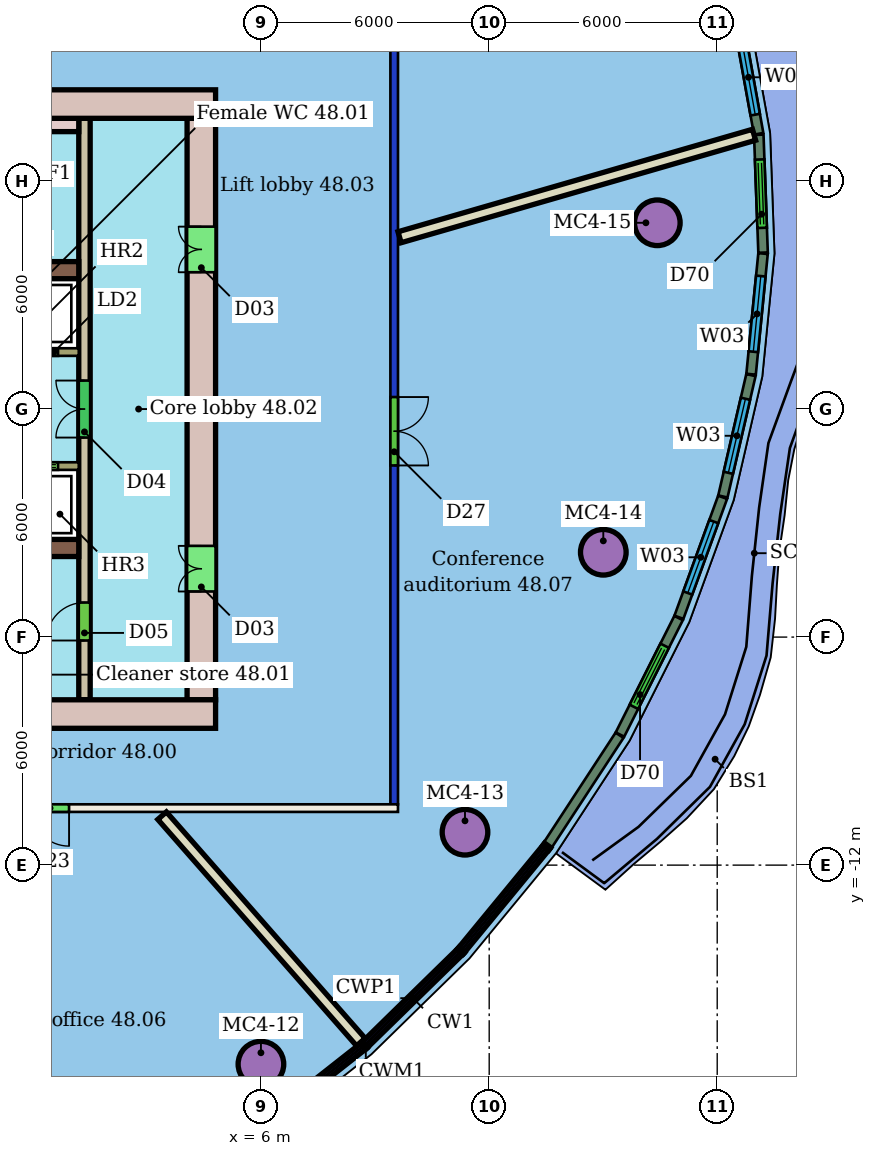
"""IFC4 building model, lengths in metres.
Left out: names, types, materials, properties, quantities, classifications, styles, units other than length and angle.
Written with IfcOpenShell. Run it as: python <this file> out.ifc"""

import sys

from ifc_helpers import new_model, si_unit, direction, frame, frame_2d, origin, origin_2d, place, context, subcontext, project, spatial, rectangle, hollow_circle, extrude, element, fill, save


model = new_model("IFC4")
c1 = context("Model", 3, precision=1e-05, world=origin(), true_north=direction((0.0, 1.0)))
c2 = subcontext(c1, "Body", "Model", "MODEL_VIEW")
j1 = project(units=[si_unit("LENGTHUNIT", "METRE"), si_unit("PLANEANGLEUNIT", "RADIAN")], contexts=[c1])
p1 = place(None, origin())
s1 = spatial("IfcSite", under=j1, at=p1, CompositionType="ELEMENT")
p2 = place(p1, origin())
s2 = spatial("IfcBuilding", under=s1, at=p2, CompositionType="ELEMENT")
p3 = place(p2, frame((0.0, 0.0, 199.3)))
s3 = spatial("IfcBuildingStorey", under=s2, at=p3, CompositionType="ELEMENT", Elevation=199.3)
for number, where, z_axis, x_axis in (
    (1, (5.993, -17.237, 0.0), (0.0, 0.0, 1.0), (1.0, 0.0, 0.0)),
    (2, (11.363, -11.134, 0.0), (0.0, 0.0, 1.0), (1.0, 0.0, 0.0)),
    (3, (15.003, -3.768, 0.0), (0.0, 0.0, 1.0), (1.0, 0.0, 0.0)),
    (4, (16.424, 4.901, 0.0), (0.0, 0.0, 1.0), (1.0, 0.0, 0.0)),
):
    element("IfcColumn", number, at=place(p3, frame(where, z_axis=z_axis, x_axis=x_axis)), inside=s3, PredefinedType="COLUMN", context=c2, shape_type="SweptSolid", body=[
        extrude(hollow_circle(Radius=0.6, WallThickness=0.045, at=origin_2d()), origin(), (0.0, 0.0, 1.0), 3.45),
    ])
p4 = place(p3, frame((9.6, -10.5, 0.0), z_axis=(0.0, 0.0, 1.0), x_axis=(-1.0, 0.0, 0.0)))
e5 = element("IfcWall", 5, at=p4, inside=s3, PredefinedType="PARTITIONING", context=c2, shape_type="SweptSolid", body=[
    extrude(rectangle(XDim=31.2, YDim=0.2, at=frame_2d((15.6, 0.0))), origin(), (0.0, 0.0, 1.0), 3.45),
])
p5 = place(p4, frame((22.137, 0.0, 0.0)))
e6 = element("IfcOpeningElement", 6, at=p5, cuts=e5, PredefinedType="OPENING", context=c2, shape_type="SweptSolid", body=[
    extrude(rectangle(XDim=1.8, YDim=2.1, at=frame_2d((0.9, 1.05))), frame((0.0, 0.11, 0.0), z_axis=(0.0, -1.0, 0.0), x_axis=(1.0, 0.0, 0.0)), (0.0, 0.0, 1.0), 0.22),
])
p6 = place(p4, frame((16.636, 0.0, 0.0)))
e7 = element("IfcOpeningElement", 7, at=p6, cuts=e5, PredefinedType="OPENING", context=c2, shape_type="SweptSolid", body=[
    extrude(rectangle(XDim=1.0, YDim=2.4, at=frame_2d((0.5, 1.2))), frame((0.0, 0.11, 0.0), z_axis=(0.0, -1.0, 0.0), x_axis=(1.0, 0.0, 0.0)), (0.0, 0.0, 1.0), 0.22),
])
p7 = place(p4, frame((8.655, 0.0, 0.0)))
e8 = element("IfcOpeningElement", 8, at=p7, cuts=e5, PredefinedType="OPENING", context=c2, shape_type="SweptSolid", body=[
    extrude(rectangle(XDim=1.0, YDim=2.4, at=frame_2d((0.5, 1.2))), frame((0.0, 0.11, 0.0), z_axis=(0.0, -1.0, 0.0), x_axis=(1.0, 0.0, 0.0)), (0.0, 0.0, 1.0), 0.22),
])
p8 = place(p3, frame((9.5, 10.4, 0.0), z_axis=(0.0, 0.0, 1.0), x_axis=(0.0, -1.0, 0.0)))
e9 = element("IfcWall", 9, at=p8, inside=s3, PredefinedType="PARTITIONING", context=c2, shape_type="SweptSolid", body=[
    extrude(rectangle(XDim=20.8, YDim=0.2, at=frame_2d((10.4, 0.0))), origin(), (0.0, 0.0, 1.0), 3.05),
])
p9 = place(p8, frame((10.084, 0.0, 0.0)))
e10 = element("IfcOpeningElement", 10, at=p9, cuts=e9, PredefinedType="OPENING", context=c2, shape_type="SweptSolid", body=[
    extrude(rectangle(XDim=1.8, YDim=2.4, at=frame_2d((0.9, 1.2))), frame((0.0, 0.11, 0.0), z_axis=(0.0, -1.0, 0.0), x_axis=(1.0, 0.0, 0.0)), (0.0, 0.0, 1.0), 0.22),
])
p10 = place(p3, frame((8.622, -16.656, 0.0), z_axis=(0.0, 0.0, 1.0), x_axis=(-0.659742211608, 0.751491992121, 0.0)))
e11 = element("IfcWall", 11, at=p10, inside=s3, PredefinedType="PARTITIONING", context=c2, shape_type="SweptSolid", body=[
    extrude(rectangle(XDim=7.927, YDim=0.3, at=frame_2d((3.963, 0.0))), origin(), (0.0, 0.0, 1.0), 3.45),
])
p11 = place(p3, frame((18.969, 7.217, 0.0), z_axis=(0.0, 0.0, 1.0), x_axis=(-0.960680652431, -0.277655693342, 0.0)))
e12 = element("IfcWall", 12, at=p11, inside=s3, PredefinedType="PARTITIONING", context=c2, shape_type="SweptSolid", body=[
    extrude(rectangle(XDim=9.709, YDim=0.3, at=frame_2d((4.854, 0.0))), origin(), (0.0, 0.0, 1.0), 3.45),
])
p12 = place(p3, frame((13.545, -11.466, 0.0), z_axis=(0.0, 0.0, 1.0), x_axis=(0.547235995567, 0.836978354054, 0.0)))
e13 = element("IfcWall", 13, at=p12, inside=s3, PredefinedType="SOLIDWALL", context=c2, shape_type="SweptSolid", body=[
    extrude(rectangle(XDim=3.445, YDim=0.25, at=frame_2d((1.722, 0.0))), origin(), (0.0, 0.0, 1.0), 3.1),
])
p13 = place(p3, frame((15.441, -8.564, 0.0), z_axis=(0.0, 0.0, 1.0), x_axis=(0.449602668961, 0.89322866057, 0.0)))
e14 = element("IfcWall", 14, at=p13, inside=s3, PredefinedType="SOLIDWALL", context=c2, shape_type="SweptSolid", body=[
    extrude(rectangle(XDim=3.431, YDim=0.25, at=frame_2d((1.716, 0.0))), origin(), (0.0, 0.0, 1.0), 3.1),
])
p14 = place(p13, frame((0.816, 0.0, 0.0)))
e15 = element("IfcOpeningElement", 15, at=p14, cuts=e14, PredefinedType="OPENING", context=c2, shape_type="SweptSolid", body=[
    extrude(rectangle(XDim=1.8, YDim=2.4, at=frame_2d((0.9, 1.2))), frame((0.0, 0.135, 0.0), z_axis=(0.0, -1.0, 0.0), x_axis=(1.0, 0.0, 0.0)), (0.0, 0.0, 1.0), 0.27),
])
p15 = place(p3, frame((16.992, -5.478, 0.0), z_axis=(0.0, 0.0, 1.0), x_axis=(0.342379036898, 0.939561916583, 0.0)))
e16 = element("IfcWall", 16, at=p15, inside=s3, PredefinedType="SOLIDWALL", context=c2, shape_type="SweptSolid", body=[
    extrude(rectangle(XDim=3.359, YDim=0.25, at=frame_2d((1.68, 0.0))), origin(), (0.0, 0.0, 1.0), 3.1),
])
p16 = place(p15, frame((0.68, 0.0, 0.9)))
e17 = element("IfcOpeningElement", 17, at=p16, cuts=e16, PredefinedType="OPENING", context=c2, shape_type="SweptSolid", body=[
    extrude(rectangle(XDim=2.0, YDim=2.1, at=frame_2d((1.0, 1.05))), frame((0.0, 0.135, 0.0), z_axis=(0.0, -1.0, 0.0), x_axis=(1.0, 0.0, 0.0)), (0.0, 0.0, 1.0), 0.27),
])
p17 = place(p3, frame((18.149, -2.3, 0.0), z_axis=(0.0, 0.0, 1.0), x_axis=(0.225196810923, 0.974313294762, 0.0)))
e18 = element("IfcWall", 18, at=p17, inside=s3, PredefinedType="SOLIDWALL", context=c2, shape_type="SweptSolid", body=[
    extrude(rectangle(XDim=3.277, YDim=0.25, at=frame_2d((1.639, 0.0))), origin(), (0.0, 0.0, 1.0), 3.1),
])
p18 = place(p17, frame((0.639, 0.0, 0.9)))
e19 = element("IfcOpeningElement", 19, at=p18, cuts=e18, PredefinedType="OPENING", context=c2, shape_type="SweptSolid", body=[
    extrude(rectangle(XDim=2.0, YDim=2.1, at=frame_2d((1.0, 1.05))), frame((0.0, 0.135, 0.0), z_axis=(0.0, -1.0, 0.0), x_axis=(1.0, 0.0, 0.0)), (0.0, 0.0, 1.0), 0.27),
])
p19 = place(p3, frame((18.891, 0.917, 0.0), z_axis=(0.0, 0.0, 1.0), x_axis=(0.09873075653, 0.995114183255, 0.0)))
e20 = element("IfcWall", 20, at=p19, inside=s3, PredefinedType="SOLIDWALL", context=c2, shape_type="SweptSolid", body=[
    extrude(rectangle(XDim=3.19, YDim=0.25, at=frame_2d((1.595, 0.0))), origin(), (0.0, 0.0, 1.0), 3.1),
])
p20 = place(p19, frame((0.595, 0.0, 0.9)))
e21 = element("IfcOpeningElement", 21, at=p20, cuts=e20, PredefinedType="OPENING", context=c2, shape_type="SweptSolid", body=[
    extrude(rectangle(XDim=2.0, YDim=2.1, at=frame_2d((1.0, 1.05))), frame((0.0, 0.135, 0.0), z_axis=(0.0, -1.0, 0.0), x_axis=(1.0, 0.0, 0.0)), (0.0, 0.0, 1.0), 0.27),
])
p21 = place(p3, frame((19.207, 4.116, 0.0), z_axis=(0.0, 0.0, 1.0), x_axis=(-0.036429625248, 0.999336220901, 0.0)))
e22 = element("IfcWall", 22, at=p21, inside=s3, PredefinedType="SOLIDWALL", context=c2, shape_type="SweptSolid", body=[
    extrude(rectangle(XDim=3.103, YDim=0.25, at=frame_2d((1.551, 0.0))), origin(), (0.0, 0.0, 1.0), 3.1),
])
p22 = place(p21, frame((0.652, 0.0, 0.0)))
e23 = element("IfcOpeningElement", 23, at=p22, cuts=e22, PredefinedType="OPENING", context=c2, shape_type="SweptSolid", body=[
    extrude(rectangle(XDim=1.8, YDim=2.4, at=frame_2d((0.9, 1.2))), frame((0.0, 0.135, 0.0), z_axis=(0.0, -1.0, 0.0), x_axis=(1.0, 0.0, 0.0)), (0.0, 0.0, 1.0), 0.27),
])
p23 = place(p3, frame((19.091, 7.243, 0.0), z_axis=(0.0, 0.0, 1.0), x_axis=(-0.177755310082, 0.984074717558, 0.0)))
e24 = element("IfcWall", 24, at=p23, inside=s3, PredefinedType="SOLIDWALL", context=c2, shape_type="SweptSolid", body=[
    extrude(rectangle(XDim=3.023, YDim=0.25, at=frame_2d((1.511, 0.0))), origin(), (0.0, 0.0, 1.0), 3.1),
])
p24 = place(p23, frame((0.511, 0.0, 0.9)))
e25 = element("IfcOpeningElement", 25, at=p24, cuts=e24, PredefinedType="OPENING", context=c2, shape_type="SweptSolid", body=[
    extrude(rectangle(XDim=2.0, YDim=2.1, at=frame_2d((1.0, 1.05))), frame((0.0, 0.135, 0.0), z_axis=(0.0, -1.0, 0.0), x_axis=(1.0, 0.0, 0.0)), (0.0, 0.0, 1.0), 0.27),
])
p25 = place(p3, frame((4.8, 8.025, 0.0), z_axis=(0.0, 0.0, 1.0), x_axis=(-1.0, 0.0, 0.0)))
e26 = element("IfcWall", 26, at=p25, inside=s3, PredefinedType="SHEAR", context=c2, shape_type="SweptSolid", body=[
    extrude(rectangle(XDim=10.8, YDim=0.75, at=frame_2d((5.4, 0.0))), origin(), (0.0, 0.0, 1.0), 3.3),
])
p26 = place(p25, frame((4.4, 0.0, 0.0)))
e27 = element("IfcOpeningElement", 27, at=p26, cuts=e26, PredefinedType="OPENING", context=c2, shape_type="SweptSolid", body=[
    extrude(rectangle(XDim=1.2, YDim=2.1, at=frame_2d((0.6, 1.05))), frame((0.0, 0.385, 0.0), z_axis=(0.0, -1.0, 0.0), x_axis=(1.0, 0.0, 0.0)), (0.0, 0.0, 1.0), 0.77),
])
p27 = place(p3, frame((-16.8, -8.025, 0.0), z_axis=(0.0, 0.0, 1.0), x_axis=(1.0, 0.0, 0.0)))
e28 = element("IfcWall", 28, at=p27, inside=s3, PredefinedType="SHEAR", context=c2, shape_type="SweptSolid", body=[
    extrude(rectangle(XDim=21.6, YDim=0.75, at=frame_2d((10.8, 0.0))), origin(), (0.0, 0.0, 1.0), 3.3),
])
p28 = place(p27, frame((4.8, 0.0, 0.0)))
e29 = element("IfcOpeningElement", 29, at=p28, cuts=e28, PredefinedType="OPENING", context=c2, shape_type="SweptSolid", body=[
    extrude(rectangle(XDim=1.2, YDim=2.1, at=frame_2d((0.6, 1.05))), frame((0.0, 0.385, 0.0), z_axis=(0.0, -1.0, 0.0), x_axis=(1.0, 0.0, 0.0)), (0.0, 0.0, 1.0), 0.77),
])
p29 = place(p3, frame((4.425, -7.65, 0.0), z_axis=(0.0, 0.0, 1.0), x_axis=(0.0, 1.0, 0.0)))
e30 = element("IfcWall", 30, at=p29, inside=s3, PredefinedType="SHEAR", context=c2, shape_type="SweptSolid", body=[
    extrude(rectangle(XDim=15.3, YDim=0.75, at=frame_2d((7.65, 0.0))), origin(), (0.0, 0.0, 1.0), 3.3),
])
p30 = place(p29, frame((2.85, 0.0, 0.0)))
e31 = element("IfcOpeningElement", 31, at=p30, cuts=e30, PredefinedType="OPENING", context=c2, shape_type="SweptSolid", body=[
    extrude(rectangle(XDim=1.2, YDim=2.1, at=frame_2d((0.6, 1.05))), frame((0.0, 0.385, 0.0), z_axis=(0.0, -1.0, 0.0), x_axis=(1.0, 0.0, 0.0)), (0.0, 0.0, 1.0), 0.77),
])
p31 = place(p29, frame((11.25, 0.0, 0.0)))
e32 = element("IfcOpeningElement", 32, at=p31, cuts=e30, PredefinedType="OPENING", context=c2, shape_type="SweptSolid", body=[
    extrude(rectangle(XDim=1.2, YDim=2.1, at=frame_2d((0.6, 1.05))), frame((0.0, 0.385, 0.0), z_axis=(0.0, -1.0, 0.0), x_axis=(1.0, 0.0, 0.0)), (0.0, 0.0, 1.0), 0.77),
])
for number, where, z_axis, x_axis in (
    (33, (-6.0, 3.655, 0.0), (0.0, 0.0, 1.0), (1.0, 0.0, 0.0)),
    (34, (-6.0, -3.655, 0.0), (0.0, 0.0, 1.0), (1.0, 0.0, 0.0)),
):
    element("IfcWall", number, at=place(p3, frame(where, z_axis=z_axis, x_axis=x_axis)), inside=s3, PredefinedType="SHEAR", context=c2, shape_type="SweptSolid", body=[
        extrude(rectangle(XDim=7.2, YDim=0.45, at=frame_2d((3.6, 0.0))), origin(), (0.0, 0.0, 1.0), 3.3),
    ])
p32 = place(p3, frame((1.35, -7.65, 0.0), z_axis=(0.0, 0.0, 1.0), x_axis=(0.0, 1.0, 0.0)))
e35 = element("IfcWall", 35, at=p32, inside=s3, PredefinedType="SHEAR", context=c2, shape_type="SweptSolid", body=[
    extrude(rectangle(XDim=15.3, YDim=0.3, at=frame_2d((7.65, 0.0))), origin(), (0.0, 0.0, 1.0), 3.3),
])
p33 = place(p32, frame((1.56, 0.0, 0.0)))
e36 = element("IfcOpeningElement", 36, at=p33, cuts=e35, PredefinedType="OPENING", context=c2, shape_type="SweptSolid", body=[
    extrude(rectangle(XDim=1.0, YDim=2.1, at=frame_2d((0.5, 1.05))), frame((0.0, 0.16, 0.0), z_axis=(0.0, -1.0, 0.0), x_axis=(1.0, 0.0, 0.0)), (0.0, 0.0, 1.0), 0.32),
])
p34 = place(p32, frame((6.9, 0.0, 0.0)))
e37 = element("IfcOpeningElement", 37, at=p34, cuts=e35, PredefinedType="OPENING", context=c2, shape_type="SweptSolid", body=[
    extrude(rectangle(XDim=1.5, YDim=2.1, at=frame_2d((0.75, 1.05))), frame((0.0, 0.16, 0.0), z_axis=(0.0, -1.0, 0.0), x_axis=(1.0, 0.0, 0.0)), (0.0, 0.0, 1.0), 0.32),
])
p35 = place(p3, frame((-13.2, 1.5, 0.0), z_axis=(0.0, 0.0, 1.0), x_axis=(1.0, 0.0, 0.0)))
e38 = element("IfcWall", 38, at=p35, inside=s3, PredefinedType="SHEAR", context=c2, shape_type="SweptSolid", body=[
    extrude(rectangle(XDim=14.4, YDim=0.2, at=frame_2d((7.2, 0.0))), origin(), (0.0, 0.0, 1.0), 3.3),
])
p36 = place(p35, frame((10.312, 0.0, 0.0)))
e39 = element("IfcOpeningElement", 39, at=p36, cuts=e38, PredefinedType="OPENING", context=c2, shape_type="SweptSolid", body=[
    extrude(rectangle(XDim=1.1, YDim=2.1, at=frame_2d((0.55, 1.05))), frame((0.0, 0.11, 0.0), z_axis=(0.0, -1.0, 0.0), x_axis=(1.0, 0.0, 0.0)), (0.0, 0.0, 1.0), 0.22),
])
p37 = place(p35, frame((12.754, 0.0, 0.0)))
e40 = element("IfcOpeningElement", 40, at=p37, cuts=e38, PredefinedType="OPENING", context=c2, shape_type="SweptSolid", body=[
    extrude(rectangle(XDim=1.1, YDim=2.1, at=frame_2d((0.55, 1.05))), frame((0.0, 0.11, 0.0), z_axis=(0.0, -1.0, 0.0), x_axis=(1.0, 0.0, 0.0)), (0.0, 0.0, 1.0), 0.22),
])
p38 = place(p35, frame((0.15, 0.0, 0.0)))
e41 = element("IfcOpeningElement", 41, at=p38, cuts=e38, PredefinedType="OPENING", context=c2, shape_type="SweptSolid", body=[
    extrude(rectangle(XDim=1.0, YDim=2.1, at=frame_2d((0.5, 1.05))), frame((0.0, 0.11, 0.0), z_axis=(0.0, -1.0, 0.0), x_axis=(1.0, 0.0, 0.0)), (0.0, 0.0, 1.0), 0.22),
])
p39 = place(p35, frame((3.365, 0.0, 0.0)))
e42 = element("IfcOpeningElement", 42, at=p39, cuts=e38, PredefinedType="OPENING", context=c2, shape_type="SweptSolid", body=[
    extrude(rectangle(XDim=1.0, YDim=2.1, at=frame_2d((0.5, 1.05))), frame((0.0, 0.11, 0.0), z_axis=(0.0, -1.0, 0.0), x_axis=(1.0, 0.0, 0.0)), (0.0, 0.0, 1.0), 0.22),
])
p40 = place(p35, frame((8.467, 0.0, 0.0)))
e43 = element("IfcOpeningElement", 43, at=p40, cuts=e38, PredefinedType="OPENING", context=c2, shape_type="SweptSolid", body=[
    extrude(rectangle(XDim=0.9, YDim=2.1, at=frame_2d((0.45, 1.05))), frame((0.0, 0.11, 0.0), z_axis=(0.0, -1.0, 0.0), x_axis=(1.0, 0.0, 0.0)), (0.0, 0.0, 1.0), 0.22),
])
p41 = place(p3, frame((1.2, -1.5, 0.0), z_axis=(0.0, 0.0, 1.0), x_axis=(-1.0, 0.0, 0.0)))
e44 = element("IfcWall", 44, at=p41, inside=s3, PredefinedType="SHEAR", context=c2, shape_type="SweptSolid", body=[
    extrude(rectangle(XDim=14.4, YDim=0.2, at=frame_2d((7.2, 0.0))), origin(), (0.0, 0.0, 1.0), 3.3),
])
p42 = place(p41, frame((7.821, 0.0, 0.0)))
e45 = element("IfcOpeningElement", 45, at=p42, cuts=e44, PredefinedType="OPENING", context=c2, shape_type="SweptSolid", body=[
    extrude(rectangle(XDim=1.2, YDim=2.1, at=frame_2d((0.6, 1.05))), frame((0.0, 0.11, 0.0), z_axis=(0.0, -1.0, 0.0), x_axis=(1.0, 0.0, 0.0)), (0.0, 0.0, 1.0), 0.22),
])
p43 = place(p41, frame((0.546, 0.0, 0.0)))
e46 = element("IfcOpeningElement", 46, at=p43, cuts=e44, PredefinedType="OPENING", context=c2, shape_type="SweptSolid", body=[
    extrude(rectangle(XDim=1.1, YDim=2.1, at=frame_2d((0.55, 1.05))), frame((0.0, 0.11, 0.0), z_axis=(0.0, -1.0, 0.0), x_axis=(1.0, 0.0, 0.0)), (0.0, 0.0, 1.0), 0.22),
])
p44 = place(p41, frame((2.592, 0.0, 0.0)))
e47 = element("IfcOpeningElement", 47, at=p44, cuts=e44, PredefinedType="OPENING", context=c2, shape_type="SweptSolid", body=[
    extrude(rectangle(XDim=0.9, YDim=2.1, at=frame_2d((0.45, 1.05))), frame((0.0, 0.11, 0.0), z_axis=(0.0, -1.0, 0.0), x_axis=(1.0, 0.0, 0.0)), (0.0, 0.0, 1.0), 0.22),
])
p45 = place(p3, frame((0.4, 7.475, 0.0), z_axis=(0.0, 0.0, 1.0), x_axis=(1.0, 0.0, 0.0)))
e48 = element("IfcWall", 48, at=p45, inside=s3, PredefinedType="SHEAR", context=c2, shape_type="SweptSolid", body=[
    extrude(rectangle(XDim=0.8, YDim=0.35, at=frame_2d((0.4, 0.0))), origin(), (0.0, 0.0, 1.0), 3.3),
])
p46 = place(p7, origin())
e49 = element("IfcDoor", 49, at=p46, inside=s3, OperationType="SINGLE_SWING_LEFT", PredefinedType="DOOR", context=c2, shape_type="SweptSolid", body=[
    extrude(rectangle(XDim=1.0, YDim=2.4, at=frame_2d((0.5, 1.2))), frame((0.0, 0.025, 0.0), z_axis=(0.0, -1.0, 0.0), x_axis=(1.0, 0.0, 0.0)), (0.0, 0.0, 1.0), 0.05),
])
fill(e8, e49)
p47 = place(p9, origin())
e50 = element("IfcDoor", 50, at=p47, inside=s3, OperationType="DOUBLE_DOOR_SINGLE_SWING", PredefinedType="DOOR", context=c2, shape_type="SweptSolid", body=[
    extrude(rectangle(XDim=1.8, YDim=2.4, at=frame_2d((0.9, 1.2))), frame((0.0, 0.025, 0.0), z_axis=(0.0, -1.0, 0.0), x_axis=(1.0, 0.0, 0.0)), (0.0, 0.0, 1.0), 0.05),
])
fill(e10, e50)
p48 = place(p14, origin())
e51 = element("IfcDoor", 51, at=p48, inside=s3, OperationType="DOUBLE_DOOR_SLIDING", PredefinedType="DOOR", context=c2, shape_type="SweptSolid", body=[
    extrude(rectangle(XDim=1.8, YDim=2.4, at=frame_2d((0.9, 1.2))), frame((0.0, 0.025, 0.0), z_axis=(0.0, -1.0, 0.0), x_axis=(1.0, 0.0, 0.0)), (0.0, 0.0, 1.0), 0.05),
])
fill(e15, e51)
p49 = place(p16, origin())
e52 = element("IfcWindow", 52, at=p49, inside=s3, PartitioningType="SINGLE_PANEL", PredefinedType="WINDOW", context=c2, shape_type="SweptSolid", body=[
    extrude(rectangle(XDim=2.0, YDim=2.1, at=frame_2d((1.0, 1.05))), frame((0.0, 0.03, 0.0), z_axis=(0.0, -1.0, 0.0), x_axis=(1.0, 0.0, 0.0)), (0.0, 0.0, 1.0), 0.06),
])
fill(e17, e52)
p50 = place(p18, origin())
e53 = element("IfcWindow", 53, at=p50, inside=s3, PartitioningType="SINGLE_PANEL", PredefinedType="WINDOW", context=c2, shape_type="SweptSolid", body=[
    extrude(rectangle(XDim=2.0, YDim=2.1, at=frame_2d((1.0, 1.05))), frame((0.0, 0.03, 0.0), z_axis=(0.0, -1.0, 0.0), x_axis=(1.0, 0.0, 0.0)), (0.0, 0.0, 1.0), 0.06),
])
fill(e19, e53)
p51 = place(p20, origin())
e54 = element("IfcWindow", 54, at=p51, inside=s3, PartitioningType="SINGLE_PANEL", PredefinedType="WINDOW", context=c2, shape_type="SweptSolid", body=[
    extrude(rectangle(XDim=2.0, YDim=2.1, at=frame_2d((1.0, 1.05))), frame((0.0, 0.03, 0.0), z_axis=(0.0, -1.0, 0.0), x_axis=(1.0, 0.0, 0.0)), (0.0, 0.0, 1.0), 0.06),
])
fill(e21, e54)
p52 = place(p22, origin())
e55 = element("IfcDoor", 55, at=p52, inside=s3, OperationType="DOUBLE_DOOR_SLIDING", PredefinedType="DOOR", context=c2, shape_type="SweptSolid", body=[
    extrude(rectangle(XDim=1.8, YDim=2.4, at=frame_2d((0.9, 1.2))), frame((0.0, 0.025, 0.0), z_axis=(0.0, -1.0, 0.0), x_axis=(1.0, 0.0, 0.0)), (0.0, 0.0, 1.0), 0.05),
])
fill(e23, e55)
p53 = place(p24, origin())
e56 = element("IfcWindow", 56, at=p53, inside=s3, PartitioningType="SINGLE_PANEL", PredefinedType="WINDOW", context=c2, shape_type="SweptSolid", body=[
    extrude(rectangle(XDim=2.0, YDim=2.1, at=frame_2d((1.0, 1.05))), frame((0.0, 0.03, 0.0), z_axis=(0.0, -1.0, 0.0), x_axis=(1.0, 0.0, 0.0)), (0.0, 0.0, 1.0), 0.06),
])
fill(e25, e56)
p54 = place(p30, origin())
e57 = element("IfcDoor", 57, at=p54, inside=s3, OperationType="DOUBLE_DOOR_SINGLE_SWING", PredefinedType="NOTDEFINED", context=c2, shape_type="SweptSolid", body=[
    extrude(rectangle(XDim=1.2, YDim=2.1, at=frame_2d((0.6, 1.05))), frame((0.0, 0.025, 0.0), z_axis=(0.0, -1.0, 0.0), x_axis=(1.0, 0.0, 0.0)), (0.0, 0.0, 1.0), 0.05),
])
fill(e31, e57)
p55 = place(p31, origin())
e58 = element("IfcDoor", 58, at=p55, inside=s3, OperationType="DOUBLE_DOOR_SINGLE_SWING", PredefinedType="NOTDEFINED", context=c2, shape_type="SweptSolid", body=[
    extrude(rectangle(XDim=1.2, YDim=2.1, at=frame_2d((0.6, 1.05))), frame((0.0, 0.025, 0.0), z_axis=(0.0, -1.0, 0.0), x_axis=(1.0, 0.0, 0.0)), (0.0, 0.0, 1.0), 0.05),
])
fill(e32, e58)
p56 = place(p33, origin())
e59 = element("IfcDoor", 59, at=p56, inside=s3, OperationType="SINGLE_SWING_LEFT", PredefinedType="NOTDEFINED", context=c2, shape_type="SweptSolid", body=[
    extrude(rectangle(XDim=1.0, YDim=2.1, at=frame_2d((0.5, 1.05))), frame((0.0, 0.025, 0.0), z_axis=(0.0, -1.0, 0.0), x_axis=(1.0, 0.0, 0.0)), (0.0, 0.0, 1.0), 0.05),
])
fill(e36, e59)
p57 = place(p34, origin())
e60 = element("IfcDoor", 60, at=p57, inside=s3, OperationType="DOUBLE_DOOR_SINGLE_SWING", PredefinedType="NOTDEFINED", context=c2, shape_type="SweptSolid", body=[
    extrude(rectangle(XDim=1.5, YDim=2.1, at=frame_2d((0.75, 1.05))), frame((0.0, 0.025, 0.0), z_axis=(0.0, -1.0, 0.0), x_axis=(1.0, 0.0, 0.0)), (0.0, 0.0, 1.0), 0.05),
])
fill(e37, e60)
p58 = place(p37, origin())
e61 = element("IfcDoor", 61, at=p58, inside=s3, OperationType="DOUBLE_DOOR_SLIDING", PredefinedType="NOTDEFINED", context=c2, shape_type="SweptSolid", body=[
    extrude(rectangle(XDim=1.1, YDim=2.1, at=frame_2d((0.55, 1.05))), frame((0.0, 0.025, 0.0), z_axis=(0.0, -1.0, 0.0), x_axis=(1.0, 0.0, 0.0)), (0.0, 0.0, 1.0), 0.05),
])
fill(e40, e61)
p59 = place(p43, origin())
e62 = element("IfcDoor", 62, at=p59, inside=s3, OperationType="DOUBLE_DOOR_SLIDING", PredefinedType="NOTDEFINED", context=c2, shape_type="SweptSolid", body=[
    extrude(rectangle(XDim=1.1, YDim=2.1, at=frame_2d((0.55, 1.05))), frame((0.0, 0.025, 0.0), z_axis=(0.0, -1.0, 0.0), x_axis=(1.0, 0.0, 0.0)), (0.0, 0.0, 1.0), 0.05),
])
fill(e46, e62)
save(model, sys.argv[1])
